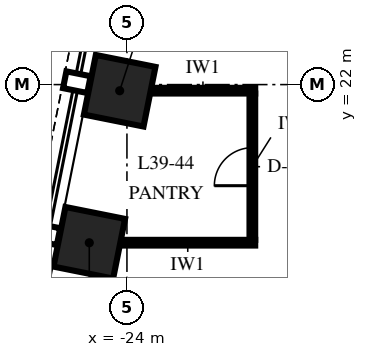
"""IFC4 building model, lengths in metres.
Left out: names, types, materials, properties, quantities, classifications, styles, units other than length and angle.
Written with IfcOpenShell. Run it as: python <this file> out.ifc"""

import sys

from ifc_helpers import new_model, si_unit, direction, frame, frame_2d, origin, origin_2d, place, context, subcontext, project, spatial, rectangle, extrude, element, fill, save


model = new_model("IFC4")
c1 = context("Model", 3, precision=1e-05, world=origin(), true_north=direction((0.0, 1.0)))
c2 = subcontext(c1, "Body", "Model", "MODEL_VIEW")
j1 = project(units=[si_unit("LENGTHUNIT", "METRE"), si_unit("PLANEANGLEUNIT", "RADIAN")], contexts=[c1])
p1 = place(None, origin())
s1 = spatial("IfcSite", under=j1, at=p1, CompositionType="ELEMENT")
p2 = place(p1, origin())
s2 = spatial("IfcBuilding", under=s1, at=p2, CompositionType="ELEMENT")
p3 = place(p2, frame((0.0, 0.0, 173.0)))
s3 = spatial("IfcBuildingStorey", under=s2, at=p3, CompositionType="ELEMENT", Elevation=173.0)
for number, where, z_axis, x_axis in (
    (1, (-24.191, 21.838, 0.0), (0.0, 0.0, 1.0), (-0.196, -0.981, 0.0)),
    (2, (-24.991, 17.838, 0.0), (0.0, 0.0, 1.0), (-0.196, -0.981, 0.0)),
):
    element("IfcColumn", number, at=place(p3, frame(where, z_axis=z_axis, x_axis=x_axis)), inside=s3, PredefinedType="COLUMN", context=c2, shape_type="SweptSolid", body=[
        extrude(rectangle(XDim=1.6, YDim=1.6, at=origin_2d()), origin(), (0.0, 0.0, 1.0), 5.0),
    ])
p4 = place(p3, frame((-24.175, 17.84, 0.0), z_axis=(0.0, 0.0, 1.0), x_axis=(1.0, 0.0, 0.0)))
e3 = element("IfcWall", 3, at=p4, inside=s3, PredefinedType="PARTITIONING", context=c2, shape_type="SweptSolid", body=[
    extrude(rectangle(XDim=3.55, YDim=0.15, at=frame_2d((1.775, 0.0))), origin(), (0.0, 0.0, 1.0), 4.25),
])
p5 = place(p3, frame((-23.375, 21.84, 0.0), z_axis=(0.0, 0.0, 1.0), x_axis=(1.0, 0.0, 0.0)))
e4 = element("IfcWall", 4, at=p5, inside=s3, PredefinedType="PARTITIONING", context=c2, shape_type="SweptSolid", body=[
    extrude(rectangle(XDim=2.75, YDim=0.15, at=frame_2d((1.375, 0.0))), origin(), (0.0, 0.0, 1.0), 4.25),
])
p6 = place(p3, frame((-20.7, 17.915, 0.0), z_axis=(0.0, 0.0, 1.0), x_axis=(0.0, 1.0, 0.0)))
e5 = element("IfcWall", 5, at=p6, inside=s3, PredefinedType="PARTITIONING", context=c2, shape_type="SweptSolid", body=[
    extrude(rectangle(XDim=3.85, YDim=0.15, at=frame_2d((1.925, 0.0))), origin(), (0.0, 0.0, 1.0), 4.25),
])
p7 = place(p6, frame((1.425, 0.0, 0.0)))
e6 = element("IfcOpeningElement", 6, at=p7, cuts=e5, PredefinedType="OPENING", context=c2, shape_type="SweptSolid", body=[
    extrude(rectangle(XDim=1.0, YDim=2.3, at=frame_2d((0.5, 1.15))), frame((0.0, 0.09, 0.0), z_axis=(0.0, -1.0, 0.0), x_axis=(1.0, 0.0, 0.0)), (0.0, 0.0, 1.0), 0.18),
])
p8 = place(p7, origin())
e7 = element("IfcDoor", 7, at=p8, inside=s3, OperationType="SINGLE_SWING_LEFT", PredefinedType="DOOR", context=c2, shape_type="SweptSolid", body=[
    extrude(rectangle(XDim=1.0, YDim=2.3, at=frame_2d((0.5, 1.15))), frame((0.0, 0.075, 0.0), z_axis=(0.0, -1.0, 0.0), x_axis=(1.0, 0.0, 0.0)), (0.0, 0.0, 1.0), 0.149),
])
fill(e6, e7)
save(model, sys.argv[1])
